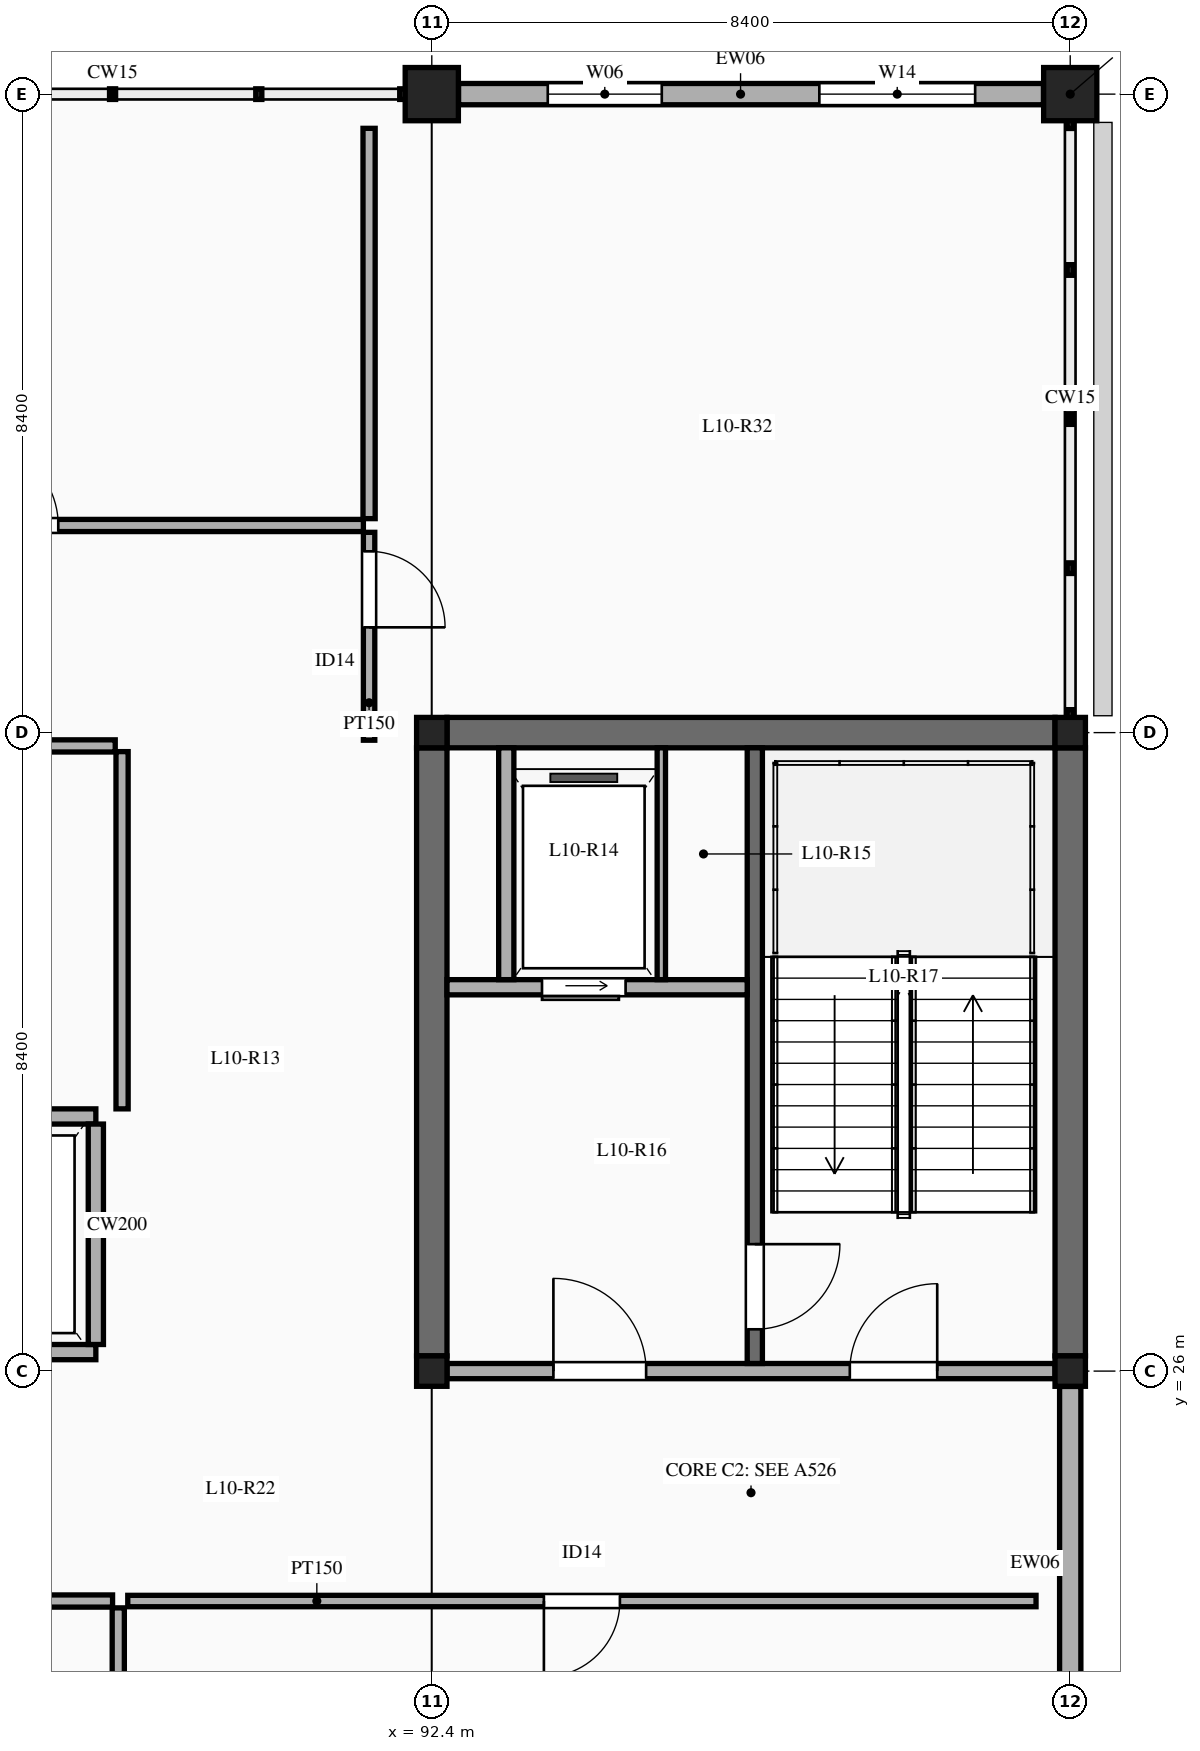
"""IFC4 building model, lengths in metres.
Left out: names, types, materials, properties, quantities, classifications, styles, units other than length and angle.
Written with IfcOpenShell. Run it as: python <this file> out.ifc"""

import sys

from ifc_helpers import new_model, si_unit, direction, frame, frame_2d, origin, origin_2d, place, context, subcontext, project, spatial, rectangle, extrude, element, fill, save


model = new_model("IFC4")
c1 = context("Model", 3, precision=1e-05, world=origin(), true_north=direction((0.0, 1.0)))
c2 = subcontext(c1, "Body", "Model", "MODEL_VIEW")
j1 = project(units=[si_unit("LENGTHUNIT", "METRE"), si_unit("PLANEANGLEUNIT", "RADIAN")], contexts=[c1])
p1 = place(None, origin())
s1 = spatial("IfcSite", under=j1, at=p1, CompositionType="ELEMENT")
p2 = place(p1, origin())
s2 = spatial("IfcBuilding", under=s1, at=p2, CompositionType="ELEMENT")
p3 = place(p2, frame((0.0, 0.0, 46.5)))
s3 = spatial("IfcBuildingStorey", under=s2, at=p3, CompositionType="ELEMENT", Elevation=46.5)
for number, where, z_axis, x_axis in (
    (1, (92.4, 26.0, 0.0), (0.0, 0.0, 1.0), (1.0, 0.0, 0.0)),
    (2, (92.4, 34.4, 0.0), (0.0, 0.0, 1.0), (1.0, 0.0, 0.0)),
):
    element("IfcColumn", number, at=place(p3, frame(where, z_axis=z_axis, x_axis=x_axis)), inside=s3, PredefinedType="COLUMN", context=c2, shape_type="SweptSolid", body=[
        extrude(rectangle(XDim=0.4, YDim=0.4, at=origin_2d()), origin(), (0.0, 0.0, 1.0), 4.5),
    ])
p4 = place(p3, frame((92.4, 42.8, 0.0), z_axis=(0.0, 0.0, 1.0), x_axis=(1.0, 0.0, 0.0)))
e3 = element("IfcColumn", 3, at=p4, inside=s3, PredefinedType="COLUMN", context=c2, shape_type="SweptSolid", body=[
    extrude(rectangle(XDim=0.7, YDim=0.7, at=origin_2d()), origin(), (0.0, 0.0, 1.0), 4.5),
])
for number, where, z_axis, x_axis in (
    (4, (100.8, 26.0, 0.0), (0.0, 0.0, 1.0), (1.0, 0.0, 0.0)),
    (5, (100.8, 34.4, 0.0), (0.0, 0.0, 1.0), (1.0, 0.0, 0.0)),
):
    element("IfcColumn", number, at=place(p3, frame(where, z_axis=z_axis, x_axis=x_axis)), inside=s3, PredefinedType="COLUMN", context=c2, shape_type="SweptSolid", body=[
        extrude(rectangle(XDim=0.4, YDim=0.4, at=origin_2d()), origin(), (0.0, 0.0, 1.0), 4.5),
    ])
p5 = place(p3, frame((100.8, 42.8, 0.0), z_axis=(0.0, 0.0, 1.0), x_axis=(1.0, 0.0, 0.0)))
e6 = element("IfcColumn", 6, at=p5, inside=s3, PredefinedType="COLUMN", context=c2, shape_type="SweptSolid", body=[
    extrude(rectangle(XDim=0.7, YDim=0.7, at=origin_2d()), origin(), (0.0, 0.0, 1.0), 4.5),
])
for number, where, z_axis, x_axis in (
    (7, (92.4, 26.2, 0.0), (0.0, 0.0, 1.0), (0.0, 1.0, 0.0)),
    (8, (100.8, 26.2, 0.0), (0.0, 0.0, 1.0), (0.0, 1.0, 0.0)),
    (9, (92.6, 34.4, 0.0), (0.0, 0.0, 1.0), (1.0, 0.0, 0.0)),
):
    element("IfcWall", number, at=place(p3, frame(where, z_axis=z_axis, x_axis=x_axis)), inside=s3, PredefinedType="SHEAR", context=c2, shape_type="SweptSolid", body=[
        extrude(rectangle(XDim=8.0, YDim=0.4, at=frame_2d((4.0, 0.0))), origin(), (0.0, 0.0, 1.0), 4.5),
    ])
p6 = place(p3, frame((92.752, 42.8, 0.0), z_axis=(0.0, 0.0, 1.0), x_axis=(1.0, 0.0, 0.0)))
e10 = element("IfcWall", 10, at=p6, inside=s3, PredefinedType="ELEMENTEDWALL", context=c2, shape_type="SweptSolid", body=[
    extrude(rectangle(XDim=7.696, YDim=0.28, at=frame_2d((3.848, 0.0))), origin(), (0.0, 0.0, 1.0), 3.55),
])
p7 = place(p6, frame((1.174, 0.0, 0.9)))
e11 = element("IfcOpeningElement", 11, at=p7, cuts=e10, PredefinedType="OPENING", context=c2, shape_type="SweptSolid", body=[
    extrude(rectangle(XDim=1.5, YDim=2.0, at=frame_2d((0.75, 1.0))), frame((0.0, 0.15, 0.0), z_axis=(0.0, -1.0, 0.0), x_axis=(1.0, 0.0, 0.0)), (0.0, 0.0, 1.0), 0.3),
])
p8 = place(p6, frame((4.747, 0.0, 0.9)))
e12 = element("IfcOpeningElement", 12, at=p8, cuts=e10, PredefinedType="OPENING", context=c2, shape_type="SweptSolid", body=[
    extrude(rectangle(XDim=2.05, YDim=2.1, at=frame_2d((1.025, 1.05))), frame((0.0, 0.15, 0.0), z_axis=(0.0, -1.0, 0.0), x_axis=(1.0, 0.0, 0.0)), (0.0, 0.0, 1.0), 0.3),
])
p9 = place(p3, frame((100.8, 17.977, 0.0), z_axis=(0.0, 0.0, 1.0), x_axis=(0.0, 1.0, 0.0)))
e13 = element("IfcWall", 13, at=p9, inside=s3, PredefinedType="ELEMENTEDWALL", context=c2, shape_type="SweptSolid", body=[
    extrude(rectangle(XDim=7.821, YDim=0.28, at=frame_2d((3.911, 0.0))), origin(), (0.0, 0.0, 1.0), 3.55),
])
p10 = place(p9, frame((1.03, 0.0, 0.9)))
e14 = element("IfcOpeningElement", 14, at=p10, cuts=e13, PredefinedType="OPENING", context=c2, shape_type="SweptSolid", body=[
    extrude(rectangle(XDim=1.85, YDim=2.05, at=frame_2d((0.925, 1.025))), frame((0.0, 0.15, 0.0), z_axis=(0.0, -1.0, 0.0), x_axis=(1.0, 0.0, 0.0)), (0.0, 0.0, 1.0), 0.3),
])
p11 = place(p3, frame((92.6, 26.0, 0.0), z_axis=(0.0, 0.0, 1.0), x_axis=(1.0, 0.0, 0.0)))
e15 = element("IfcWall", 15, at=p11, inside=s3, PredefinedType="SOLIDWALL", context=c2, shape_type="SweptSolid", body=[
    extrude(rectangle(XDim=8.0, YDim=0.2, at=frame_2d((4.0, 0.0))), origin(), (0.0, 0.0, 1.0), 3.83),
])
p12 = place(p11, frame((1.4, 0.0, 0.0)))
e16 = element("IfcOpeningElement", 16, at=p12, cuts=e15, PredefinedType="OPENING", context=c2, shape_type="SweptSolid", body=[
    extrude(rectangle(XDim=1.22, YDim=2.15, at=frame_2d((0.61, 1.075))), frame((0.0, 0.11, 0.0), z_axis=(0.0, -1.0, 0.0), x_axis=(1.0, 0.0, 0.0)), (0.0, 0.0, 1.0), 0.22),
])
p13 = place(p11, frame((5.3, 0.0, 0.0)))
e17 = element("IfcOpeningElement", 17, at=p13, cuts=e15, PredefinedType="OPENING", context=c2, shape_type="SweptSolid", body=[
    extrude(rectangle(XDim=1.15, YDim=2.15, at=frame_2d((0.575, 1.075))), frame((0.0, 0.11, 0.0), z_axis=(0.0, -1.0, 0.0), x_axis=(1.0, 0.0, 0.0)), (0.0, 0.0, 1.0), 0.22),
])
p14 = place(p3, frame((96.65, 26.1, 0.0), z_axis=(0.0, 0.0, 1.0), x_axis=(0.0, 1.0, 0.0)))
e18 = element("IfcWall", 18, at=p14, inside=s3, PredefinedType="SOLIDWALL", context=c2, shape_type="SweptSolid", body=[
    extrude(rectangle(XDim=8.1, YDim=0.2, at=frame_2d((4.05, 0.0))), origin(), (0.0, 0.0, 1.0), 4.3),
])
p15 = place(p14, frame((0.45, 0.0, 0.0)))
e19 = element("IfcOpeningElement", 19, at=p15, cuts=e18, PredefinedType="OPENING", context=c2, shape_type="SweptSolid", body=[
    extrude(rectangle(XDim=1.12, YDim=2.15, at=frame_2d((0.56, 1.075))), frame((0.0, 0.11, 0.0), z_axis=(0.0, -1.0, 0.0), x_axis=(1.0, 0.0, 0.0)), (0.0, 0.0, 1.0), 0.22),
])
p16 = place(p3, frame((92.6, 31.05, 0.0), z_axis=(0.0, 0.0, 1.0), x_axis=(1.0, 0.0, 0.0)))
e20 = element("IfcWall", 20, at=p16, inside=s3, PredefinedType="SOLIDWALL", context=c2, shape_type="SweptSolid", body=[
    extrude(rectangle(XDim=3.95, YDim=0.2, at=frame_2d((1.975, 0.0))), origin(), (0.0, 0.0, 1.0), 4.3),
])
p17 = place(p16, frame((1.25, 0.0, 0.0)))
e21 = element("IfcOpeningElement", 21, at=p17, cuts=e20, PredefinedType="OPENING", context=c2, shape_type="SweptSolid", body=[
    extrude(rectangle(XDim=1.1, YDim=2.15, at=frame_2d((0.55, 1.075))), frame((0.0, 0.11, 0.0), z_axis=(0.0, -1.0, 0.0), x_axis=(1.0, 0.0, 0.0)), (0.0, 0.0, 1.0), 0.22),
])
p18 = place(p3, frame((95.42, 31.15, 0.0), z_axis=(0.0, 0.0, 1.0), x_axis=(0.0, 1.0, 0.0)))
e22 = element("IfcWall", 22, at=p18, inside=s3, PredefinedType="PARTITIONING", context=c2, shape_type="SweptSolid", body=[
    extrude(rectangle(XDim=3.05, YDim=0.11, at=frame_2d((1.525, 0.0))), origin(), (0.0, 0.0, 1.0), 4.3),
])
p19 = place(p3, frame((93.38, 31.15, 0.0), z_axis=(0.0, 0.0, 1.0), x_axis=(0.0, 1.0, 0.0)))
e23 = element("IfcWall", 23, at=p19, inside=s3, PredefinedType="SOLIDWALL", context=c2, shape_type="SweptSolid", body=[
    extrude(rectangle(XDim=3.05, YDim=0.2, at=frame_2d((1.525, 0.0))), origin(), (0.0, 0.0, 1.0), 4.3),
])
p20 = place(p3, frame((85.62, 26.25, 0.0), z_axis=(0.0, 0.0, 1.0), x_axis=(1.0, 0.0, 0.0)))
e24 = element("IfcWall", 24, at=p20, inside=s3, PredefinedType="SOLIDWALL", context=c2, shape_type="SweptSolid", body=[
    extrude(rectangle(XDim=2.36, YDim=0.2, at=frame_2d((1.18, 0.0))), origin(), (0.0, 0.0, 1.0), 3.83),
])
p21 = place(p20, frame((0.605, 0.0, 0.0)))
e25 = element("IfcOpeningElement", 25, at=p21, cuts=e24, PredefinedType="OPENING", context=c2, shape_type="SweptSolid", body=[
    extrude(rectangle(XDim=1.15, YDim=2.2, at=frame_2d((0.575, 1.1))), frame((0.0, 0.11, 0.0), z_axis=(0.0, -1.0, 0.0), x_axis=(1.0, 0.0, 0.0)), (0.0, 0.0, 1.0), 0.22),
])
p22 = place(p3, frame((85.62, 29.35, 0.0), z_axis=(0.0, 0.0, 1.0), x_axis=(1.0, 0.0, 0.0)))
e26 = element("IfcWall", 26, at=p22, inside=s3, PredefinedType="SOLIDWALL", context=c2, shape_type="SweptSolid", body=[
    extrude(rectangle(XDim=2.36, YDim=0.2, at=frame_2d((1.18, 0.0))), origin(), (0.0, 0.0, 1.0), 4.3),
])
p23 = place(p3, frame((87.98, 26.35, 0.0), z_axis=(0.0, 0.0, 1.0), x_axis=(0.0, 1.0, 0.0)))
e27 = element("IfcWall", 27, at=p23, inside=s3, PredefinedType="SOLIDWALL", context=c2, shape_type="SweptSolid", body=[
    extrude(rectangle(XDim=2.9, YDim=0.2, at=frame_2d((1.45, 0.0))), origin(), (0.0, 0.0, 1.0), 4.03),
])
p24 = place(p3, frame((88.325, 29.45, 0.0), z_axis=(0.0, 0.0, 1.0), x_axis=(0.0, 1.0, 0.0)))
e28 = element("IfcWall", 28, at=p24, inside=s3, PredefinedType="PARTITIONING", context=c2, shape_type="SweptSolid", body=[
    extrude(rectangle(XDim=4.7, YDim=0.16, at=frame_2d((2.35, 0.0))), origin(), (0.0, 0.0, 1.0), 3.45),
])
p25 = place(p3, frame((84.405, 34.225, 0.0), z_axis=(0.0, 0.0, 1.0), x_axis=(1.0, 0.0, 0.0)))
e29 = element("IfcWall", 29, at=p25, inside=s3, PredefinedType="PARTITIONING", context=c2, shape_type="SweptSolid", body=[
    extrude(rectangle(XDim=3.83, YDim=0.16, at=frame_2d((1.915, 0.0))), origin(), (0.0, 0.0, 1.0), 3.45),
])
p26 = place(p3, frame((84.51, 22.975, 0.0), z_axis=(0.0, 0.0, 1.0), x_axis=(1.0, 0.0, 0.0)))
e30 = element("IfcWall", 30, at=p26, inside=s3, PredefinedType="PARTITIONING", context=c2, shape_type="SweptSolid", body=[
    extrude(rectangle(XDim=3.69, YDim=0.16, at=frame_2d((1.845, 0.0))), origin(), (0.0, 0.0, 1.0), 3.45),
])
p27 = place(p3, frame((88.4, 22.975, 0.0), z_axis=(0.0, 0.0, 1.0), x_axis=(1.0, 0.0, 0.0)))
e31 = element("IfcWall", 31, at=p27, inside=s3, PredefinedType="PARTITIONING", context=c2, shape_type="SweptSolid", body=[
    extrude(rectangle(XDim=11.95, YDim=0.15, at=frame_2d((5.975, 0.0))), origin(), (0.0, 0.0, 1.0), 3.45),
])
p28 = place(p27, frame((5.475, 0.0, 0.0)))
e32 = element("IfcOpeningElement", 32, at=p28, cuts=e31, PredefinedType="OPENING", context=c2, shape_type="SweptSolid", body=[
    extrude(rectangle(XDim=1.0, YDim=2.15, at=frame_2d((0.5, 1.075))), frame((0.0, 0.085, 0.0), z_axis=(0.0, -1.0, 0.0), x_axis=(1.0, 0.0, 0.0)), (0.0, 0.0, 1.0), 0.17),
])
p29 = place(p3, frame((88.275, 16.215, 0.0), z_axis=(0.0, 0.0, 1.0), x_axis=(0.0, 1.0, 0.0)))
e33 = element("IfcWall", 33, at=p29, inside=s3, PredefinedType="PARTITIONING", context=c2, shape_type="SweptSolid", body=[
    extrude(rectangle(XDim=6.67, YDim=0.16, at=frame_2d((3.335, 0.0))), origin(), (0.0, 0.0, 1.0), 3.45),
])
p30 = place(p3, frame((76.95, 37.125, 0.0), z_axis=(0.0, 0.0, 1.0), x_axis=(1.0, 0.0, 0.0)))
e34 = element("IfcWall", 34, at=p30, inside=s3, PredefinedType="PARTITIONING", context=c2, shape_type="SweptSolid", body=[
    extrude(rectangle(XDim=14.55, YDim=0.16, at=frame_2d((7.275, 0.0))), origin(), (0.0, 0.0, 1.0), 3.45),
])
p31 = place(p30, frame((9.436, 0.0, 0.0)))
e35 = element("IfcOpeningElement", 35, at=p31, cuts=e34, PredefinedType="OPENING", context=c2, shape_type="SweptSolid", body=[
    extrude(rectangle(XDim=1.1, YDim=2.2, at=frame_2d((0.55, 1.1))), frame((0.0, 0.09, 0.0), z_axis=(0.0, -1.0, 0.0), x_axis=(1.0, 0.0, 0.0)), (0.0, 0.0, 1.0), 0.18),
])
p32 = place(p3, frame((91.575, 34.3, 0.0), z_axis=(0.0, 0.0, 1.0), x_axis=(0.0, 1.0, 0.0)))
e36 = element("IfcWall", 36, at=p32, inside=s3, PredefinedType="PARTITIONING", context=c2, shape_type="SweptSolid", body=[
    extrude(rectangle(XDim=2.735, YDim=0.15, at=frame_2d((1.367, 0.0))), origin(), (0.0, 0.0, 1.0), 3.45),
])
p33 = place(p32, frame((1.485, 0.0, 0.0)))
e37 = element("IfcOpeningElement", 37, at=p33, cuts=e36, PredefinedType="OPENING", context=c2, shape_type="SweptSolid", body=[
    extrude(rectangle(XDim=1.0, YDim=2.15, at=frame_2d((0.5, 1.075))), frame((0.0, 0.085, 0.0), z_axis=(0.0, -1.0, 0.0), x_axis=(1.0, 0.0, 0.0)), (0.0, 0.0, 1.0), 0.17),
])
p34 = place(p3, frame((91.575, 37.215, 0.0), z_axis=(0.0, 0.0, 1.0), x_axis=(0.0, 1.0, 0.0)))
e38 = element("IfcWall", 38, at=p34, inside=s3, PredefinedType="PARTITIONING", context=c2, shape_type="SweptSolid", body=[
    extrude(rectangle(XDim=5.135, YDim=0.16, at=frame_2d((2.567, 0.0))), origin(), (0.0, 0.0, 1.0), 3.45),
])
p35 = place(p7, origin())
e39 = element("IfcWindow", 39, at=p35, inside=s3, PartitioningType="DOUBLE_PANEL_VERTICAL", PredefinedType="WINDOW", context=c2, shape_type="SweptSolid", body=[
    extrude(rectangle(XDim=1.5, YDim=2.0, at=frame_2d((0.75, 1.0))), frame((0.0, 0.03, 0.0), z_axis=(0.0, -1.0, 0.0), x_axis=(1.0, 0.0, 0.0)), (0.0, 0.0, 1.0), 0.06),
])
fill(e11, e39)
p36 = place(p8, origin())
e40 = element("IfcWindow", 40, at=p36, inside=s3, PartitioningType="TRIPLE_PANEL_VERTICAL", PredefinedType="WINDOW", context=c2, shape_type="SweptSolid", body=[
    extrude(rectangle(XDim=2.05, YDim=2.1, at=frame_2d((1.025, 1.05))), frame((0.0, 0.03, 0.0), z_axis=(0.0, -1.0, 0.0), x_axis=(1.0, 0.0, 0.0)), (0.0, 0.0, 1.0), 0.06),
])
fill(e12, e40)
p37 = place(p12, origin())
e41 = element("IfcDoor", 41, at=p37, inside=s3, OperationType="SINGLE_SWING_LEFT", PredefinedType="DOOR", context=c2, shape_type="SweptSolid", body=[
    extrude(rectangle(XDim=1.22, YDim=2.15, at=frame_2d((0.61, 1.075))), frame((0.0, 0.025, 0.0), z_axis=(0.0, -1.0, 0.0), x_axis=(1.0, 0.0, 0.0)), (0.0, 0.0, 1.0), 0.05),
])
fill(e16, e41)
p38 = place(p13, origin())
e42 = element("IfcDoor", 42, at=p38, inside=s3, OperationType="SINGLE_SWING_RIGHT", PredefinedType="DOOR", context=c2, shape_type="SweptSolid", body=[
    extrude(rectangle(XDim=1.15, YDim=2.15, at=frame_2d((0.575, 1.075))), frame((0.0, 0.025, 0.0), z_axis=(0.0, -1.0, 0.0), x_axis=(1.0, 0.0, 0.0)), (0.0, 0.0, 1.0), 0.05),
])
fill(e17, e42)
p39 = place(p15, frame((1.12, 0.0, 0.0), z_axis=(0.0, 0.0, 1.0), x_axis=(-1.0, 0.0, 0.0)))
e43 = element("IfcDoor", 43, at=p39, inside=s3, OperationType="SINGLE_SWING_LEFT", PredefinedType="DOOR", context=c2, shape_type="SweptSolid", body=[
    extrude(rectangle(XDim=1.12, YDim=2.15, at=frame_2d((0.56, 1.075))), frame((0.0, 0.025, 0.0), z_axis=(0.0, -1.0, 0.0), x_axis=(1.0, 0.0, 0.0)), (0.0, 0.0, 1.0), 0.05),
])
fill(e19, e43)
p40 = place(p17, frame((1.1, 0.0, 0.0), z_axis=(0.0, 0.0, 1.0), x_axis=(-1.0, 0.0, 0.0)))
e44 = element("IfcDoor", 44, at=p40, inside=s3, OperationType="SLIDING_TO_LEFT", PredefinedType="DOOR", context=c2, shape_type="SweptSolid", body=[
    extrude(rectangle(XDim=1.1, YDim=2.15, at=frame_2d((0.55, 1.075))), frame((0.0, 0.025, 0.0), z_axis=(0.0, -1.0, 0.0), x_axis=(1.0, 0.0, 0.0)), (0.0, 0.0, 1.0), 0.05),
])
fill(e21, e44)
p41 = place(p28, frame((1.0, 0.0, 0.0), z_axis=(0.0, 0.0, 1.0), x_axis=(-1.0, 0.0, 0.0)))
e45 = element("IfcDoor", 45, at=p41, inside=s3, OperationType="SINGLE_SWING_RIGHT", PredefinedType="DOOR", context=c2, shape_type="SweptSolid", body=[
    extrude(rectangle(XDim=1.0, YDim=2.15, at=frame_2d((0.5, 1.075))), frame((0.0, 0.025, 0.0), z_axis=(0.0, -1.0, 0.0), x_axis=(1.0, 0.0, 0.0)), (0.0, 0.0, 1.0), 0.05),
])
fill(e32, e45)
p42 = place(p31, origin())
e46 = element("IfcDoor", 46, at=p42, inside=s3, OperationType="SINGLE_SWING_LEFT", PredefinedType="DOOR", context=c2, shape_type="SweptSolid", body=[
    extrude(rectangle(XDim=1.1, YDim=2.2, at=frame_2d((0.55, 1.1))), frame((0.0, 0.025, 0.0), z_axis=(0.0, -1.0, 0.0), x_axis=(1.0, 0.0, 0.0)), (0.0, 0.0, 1.0), 0.05),
])
fill(e35, e46)
p43 = place(p33, frame((1.0, 0.0, 0.0), z_axis=(0.0, 0.0, 1.0), x_axis=(-1.0, 0.0, 0.0)))
e47 = element("IfcDoor", 47, at=p43, inside=s3, OperationType="SINGLE_SWING_RIGHT", PredefinedType="DOOR", context=c2, shape_type="SweptSolid", body=[
    extrude(rectangle(XDim=1.0, YDim=2.15, at=frame_2d((0.5, 1.075))), frame((0.0, 0.025, 0.0), z_axis=(0.0, -1.0, 0.0), x_axis=(1.0, 0.0, 0.0)), (0.0, 0.0, 1.0), 0.05),
])
fill(e37, e47)
save(model, sys.argv[1])
